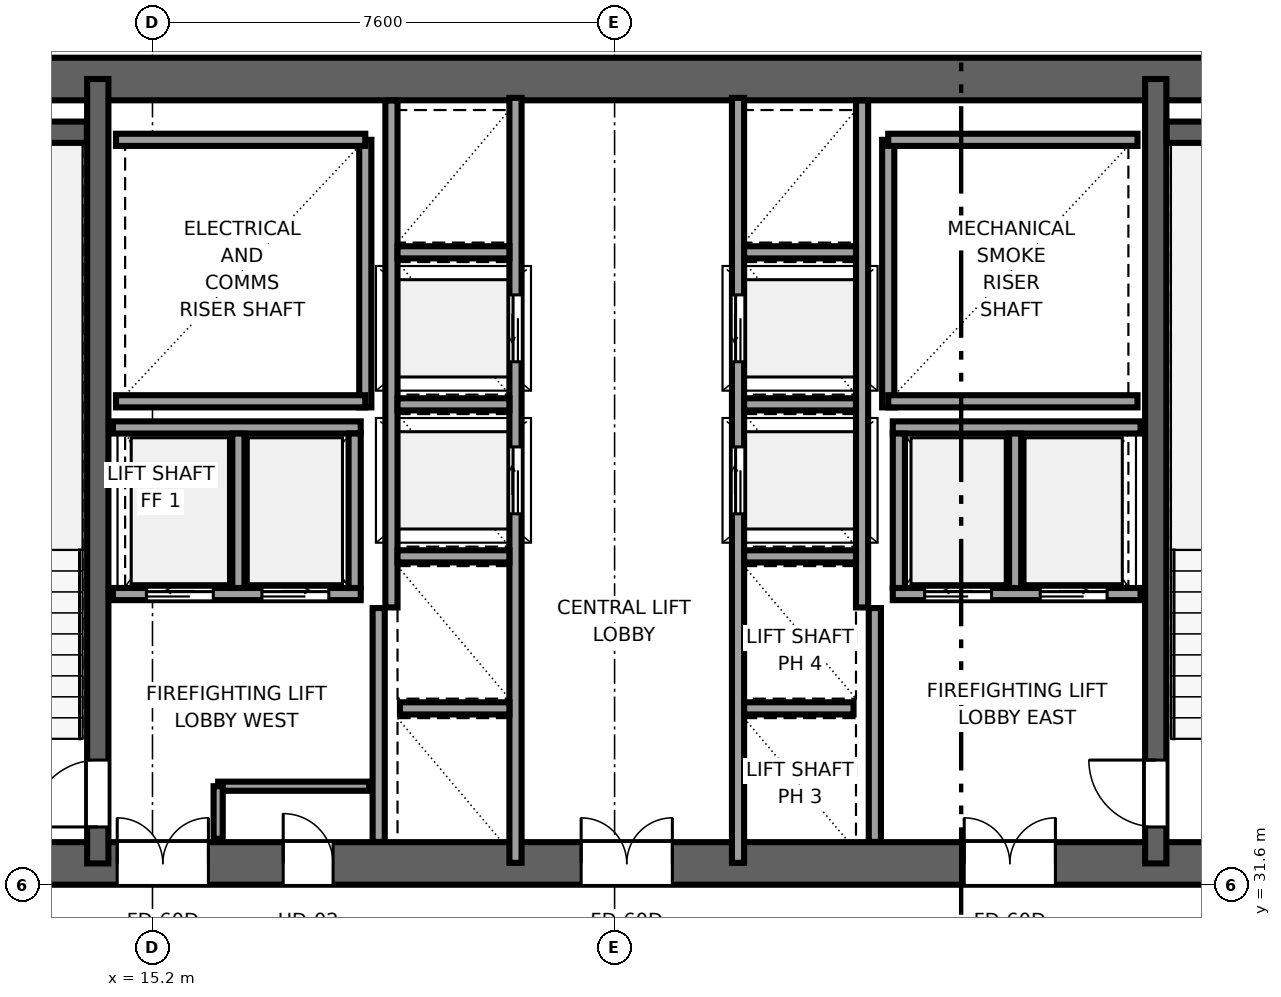
"""IFC4 building model, lengths in metres.
Left out: names, types, materials, properties, quantities, classifications, styles, units other than length and angle.
Written with IfcOpenShell. Run it as: python <this file> out.ifc"""

import sys

from ifc_helpers import new_model, si_unit, direction, frame, frame_2d, origin, place, context, subcontext, project, spatial, rectangle, extrude, source, transform, mapped, element, fill, save


model = new_model("IFC4")
c1 = context("Model", 3, precision=1e-05, world=origin(), true_north=direction((0.0, 1.0)))
c2 = subcontext(c1, "Body", "Model", "MODEL_VIEW")
j1 = project(units=[si_unit("LENGTHUNIT", "METRE"), si_unit("PLANEANGLEUNIT", "RADIAN")], contexts=[c1])
p1 = place(None, origin())
s1 = spatial("IfcSite", under=j1, at=p1, CompositionType="ELEMENT")
p2 = place(p1, origin())
s2 = spatial("IfcBuilding", under=s1, at=p2, CompositionType="ELEMENT")
p3 = place(p2, frame((0.0, 0.0, 132.85)))
s3 = spatial("IfcBuildingStorey", under=s2, at=p3, CompositionType="ELEMENT", Elevation=132.85)
p4 = place(p3, frame((9.8, 31.95, 0.0), z_axis=(0.0, 0.0, 1.0), x_axis=(1.0, 0.0, 0.0)))
e1 = element("IfcWall", 1, at=p4, inside=s3, PredefinedType="SHEAR", context=c2, shape_type="SweptSolid", body=[
    extrude(rectangle(XDim=26.4, YDim=0.7, at=frame_2d((13.2, 0.0))), origin(), (0.0, 0.0, 1.0), 3.55),
])
p5 = place(p4, frame((6.32, 0.0, 0.0), z_axis=(0.0, 0.0, 1.0), x_axis=(-1.0, 0.0, 0.0)))
e2 = element("IfcOpeningElement", 2, at=p5, cuts=e1, PredefinedType="OPENING", context=c2, shape_type="SweptSolid", body=[
    extrude(rectangle(XDim=1.5, YDim=2.04, at=frame_2d((0.75, 1.02))), frame((0.0, 0.36, 0.0), z_axis=(0.0, -1.0, 0.0), x_axis=(1.0, 0.0, 0.0)), (0.0, 0.0, 1.0), 0.72),
])
p6 = place(p4, frame((13.95, 0.0, 0.0), z_axis=(0.0, 0.0, 1.0), x_axis=(-1.0, 0.0, 0.0)))
e3 = element("IfcOpeningElement", 3, at=p6, cuts=e1, PredefinedType="OPENING", context=c2, shape_type="SweptSolid", body=[
    extrude(rectangle(XDim=1.5, YDim=2.04, at=frame_2d((0.75, 1.02))), frame((0.0, 0.36, 0.0), z_axis=(0.0, -1.0, 0.0), x_axis=(1.0, 0.0, 0.0)), (0.0, 0.0, 1.0), 0.72),
])
p7 = place(p4, frame((20.25, 0.0, 0.0), z_axis=(0.0, 0.0, 1.0), x_axis=(-1.0, 0.0, 0.0)))
e4 = element("IfcOpeningElement", 4, at=p7, cuts=e1, PredefinedType="OPENING", context=c2, shape_type="SweptSolid", body=[
    extrude(rectangle(XDim=1.5, YDim=2.04, at=frame_2d((0.75, 1.02))), frame((0.0, 0.36, 0.0), z_axis=(0.0, -1.0, 0.0), x_axis=(1.0, 0.0, 0.0)), (0.0, 0.0, 1.0), 0.72),
])
p8 = place(p4, frame((8.37, 0.0, 0.0), z_axis=(0.0, 0.0, 1.0), x_axis=(-1.0, 0.0, 0.0)))
e5 = element("IfcOpeningElement", 5, at=p8, cuts=e1, PredefinedType="OPENING", context=c2, shape_type="SweptSolid", body=[
    extrude(rectangle(XDim=0.82, YDim=2.01, at=frame_2d((0.41, 1.005))), frame((0.0, 0.36, 0.0), z_axis=(0.0, -1.0, 0.0), x_axis=(1.0, 0.0, 0.0)), (0.0, 0.0, 1.0), 0.72),
])
p9 = place(p3, frame((9.8, 44.85, 0.0), z_axis=(0.0, 0.0, 1.0), x_axis=(1.0, 0.0, 0.0)))
e6 = element("IfcWall", 6, at=p9, inside=s3, PredefinedType="SHEAR", context=c2, shape_type="SweptSolid", body=[
    extrude(rectangle(XDim=26.4, YDim=0.7, at=frame_2d((13.2, 0.0))), origin(), (0.0, 0.0, 1.0), 3.55),
])
p10 = place(p3, frame((14.3, 31.95, 0.0), z_axis=(0.0, 0.0, 1.0), x_axis=(0.0, 1.0, 0.0)))
e7 = element("IfcWall", 7, at=p10, inside=s3, PredefinedType="SHEAR", context=c2, shape_type="SweptSolid", body=[
    extrude(rectangle(XDim=12.9, YDim=0.35, at=frame_2d((6.45, 0.0))), origin(), (0.0, 0.0, 1.0), 3.55),
])
p11 = place(p10, frame((0.6, 0.0, 0.0)))
e8 = element("IfcOpeningElement", 8, at=p11, cuts=e7, PredefinedType="OPENING", context=c2, shape_type="SweptSolid", body=[
    extrude(rectangle(XDim=1.1, YDim=2.12, at=frame_2d((0.55, 1.06))), frame((0.0, 0.185, 0.0), z_axis=(0.0, -1.0, 0.0), x_axis=(1.0, 0.0, 0.0)), (0.0, 0.0, 1.0), 0.37),
])
p12 = place(p3, frame((31.7, 31.95, 0.0), z_axis=(0.0, 0.0, 1.0), x_axis=(0.0, 1.0, 0.0)))
e9 = element("IfcWall", 9, at=p12, inside=s3, PredefinedType="SHEAR", context=c2, shape_type="SweptSolid", body=[
    extrude(rectangle(XDim=12.9, YDim=0.35, at=frame_2d((6.45, 0.0))), origin(), (0.0, 0.0, 1.0), 3.55),
])
p13 = place(p12, frame((1.7, 0.0, 0.0), z_axis=(0.0, 0.0, 1.0), x_axis=(-1.0, 0.0, 0.0)))
e10 = element("IfcOpeningElement", 10, at=p13, cuts=e9, PredefinedType="OPENING", context=c2, shape_type="SweptSolid", body=[
    extrude(rectangle(XDim=1.1, YDim=2.12, at=frame_2d((0.55, 1.06))), frame((0.0, 0.185, 0.0), z_axis=(0.0, -1.0, 0.0), x_axis=(1.0, 0.0, 0.0)), (0.0, 0.0, 1.0), 0.37),
])
for number, where, z_axis, x_axis in (
    (11, (10.52, 43.975, 0.0), (0.0, 0.0, 1.0), (1.0, 0.0, 0.0)),
    (12, (31.88, 43.975, 0.0), (0.0, 0.0, 1.0), (1.0, 0.0, 0.0)),
):
    element("IfcWall", number, at=place(p3, frame(where, z_axis=z_axis, x_axis=x_axis)), inside=s3, PredefinedType="SHEAR", context=c2, shape_type="SweptSolid", body=[
        extrude(rectangle(XDim=3.6, YDim=0.35, at=frame_2d((1.8, 0.0))), origin(), (0.0, 0.0, 1.0), 3.55),
    ])
p14 = place(p3, frame((18.7, 39.45, 0.0), z_axis=(0.0, 0.0, 1.0), x_axis=(0.0, 1.0, 0.0)))
e13 = element("IfcWall", 13, at=p14, inside=s3, PredefinedType="SOLIDWALL", context=c2, shape_type="SweptSolid", body=[
    extrude(rectangle(XDim=4.4, YDim=0.2, at=frame_2d((2.2, 0.0))), origin(), (0.0, 0.0, 1.0), 3.37),
])
for number, where, z_axis, x_axis in (
    (14, (14.6, 39.55, 0.0), (0.0, 0.0, 1.0), (1.0, 0.0, 0.0)),
    (15, (14.6, 43.85, 0.0), (0.0, 0.0, 1.0), (1.0, 0.0, 0.0)),
):
    element("IfcWall", number, at=place(p3, frame(where, z_axis=z_axis, x_axis=x_axis)), inside=s3, PredefinedType="SOLIDWALL", context=c2, shape_type="SweptSolid", body=[
        extrude(rectangle(XDim=4.1, YDim=0.2, at=frame_2d((2.05, 0.0))), origin(), (0.0, 0.0, 1.0), 3.37),
    ])
p15 = place(p3, frame((27.3, 39.45, 0.0), z_axis=(0.0, 0.0, 1.0), x_axis=(0.0, 1.0, 0.0)))
e16 = element("IfcWall", 16, at=p15, inside=s3, PredefinedType="SOLIDWALL", context=c2, shape_type="SweptSolid", body=[
    extrude(rectangle(XDim=4.4, YDim=0.2, at=frame_2d((2.2, 0.0))), origin(), (0.0, 0.0, 1.0), 3.37),
])
for number, where, z_axis, x_axis in (
    (17, (27.3, 39.55, 0.0), (0.0, 0.0, 1.0), (1.0, 0.0, 0.0)),
    (18, (27.3, 43.85, 0.0), (0.0, 0.0, 1.0), (1.0, 0.0, 0.0)),
):
    element("IfcWall", number, at=place(p3, frame(where, z_axis=z_axis, x_axis=x_axis)), inside=s3, PredefinedType="SOLIDWALL", context=c2, shape_type="SweptSolid", body=[
        extrude(rectangle(XDim=4.1, YDim=0.2, at=frame_2d((2.05, 0.0))), origin(), (0.0, 0.0, 1.0), 3.37),
    ])
for number, where, z_axis, x_axis in (
    (19, (18.92, 32.304, 0.0), (0.0, 0.0, 1.0), (0.0, 1.0, 0.0)),
    (20, (27.08, 32.304, 0.0), (0.0, 0.0, 1.0), (0.0, 1.0, 0.0)),
):
    element("IfcWall", number, at=place(p3, frame(where, z_axis=z_axis, x_axis=x_axis)), inside=s3, PredefinedType="SOLIDWALL", context=c2, shape_type="SweptSolid", body=[
        extrude(rectangle(XDim=3.846, YDim=0.2, at=frame_2d((1.923, 0.0))), origin(), (0.0, 0.0, 1.0), 3.37),
    ])
p16 = place(p3, frame((21.17, 31.96, 0.0), z_axis=(0.0, 0.0, 1.0), x_axis=(0.0, 1.0, 0.0)))
e21 = element("IfcWall", 21, at=p16, inside=s3, PredefinedType="SOLIDWALL", context=c2, shape_type="SweptSolid", body=[
    extrude(rectangle(XDim=12.58, YDim=0.2, at=frame_2d((6.29, 0.0))), origin(), (0.0, 0.0, 1.0), 3.37),
])
p17 = place(p16, frame((5.74, 0.0, 0.0)))
e22 = element("IfcOpeningElement", 22, at=p17, cuts=e21, PredefinedType="OPENING", context=c2, shape_type="SweptSolid", body=[
    extrude(rectangle(XDim=1.1, YDim=2.12, at=frame_2d((0.55, 1.06))), frame((0.0, 0.11, 0.0), z_axis=(0.0, -1.0, 0.0), x_axis=(1.0, 0.0, 0.0)), (0.0, 0.0, 1.0), 0.22),
])
p18 = place(p16, frame((8.24, 0.0, 0.0)))
e23 = element("IfcOpeningElement", 23, at=p18, cuts=e21, PredefinedType="OPENING", context=c2, shape_type="SweptSolid", body=[
    extrude(rectangle(XDim=1.1, YDim=2.12, at=frame_2d((0.55, 1.06))), frame((0.0, 0.11, 0.0), z_axis=(0.0, -1.0, 0.0), x_axis=(1.0, 0.0, 0.0)), (0.0, 0.0, 1.0), 0.22),
])
p19 = place(p3, frame((19.13, 36.16, 0.0), z_axis=(0.0, 0.0, 1.0), x_axis=(0.0, 1.0, 0.0)))
e24 = element("IfcWall", 24, at=p19, inside=s3, PredefinedType="SOLIDWALL", context=c2, shape_type="SweptSolid", body=[
    extrude(rectangle(XDim=8.336, YDim=0.2, at=frame_2d((4.168, 0.0))), origin(), (0.0, 0.0, 1.0), 3.37),
])
p20 = place(p3, frame((19.27, 34.5, 0.0), z_axis=(0.0, 0.0, 1.0), x_axis=(1.0, 0.0, 0.0)))
e25 = element("IfcWall", 25, at=p20, inside=s3, PredefinedType="SOLIDWALL", context=c2, shape_type="SweptSolid", body=[
    extrude(rectangle(XDim=1.8, YDim=0.2, at=frame_2d((0.9, 0.0))), origin(), (0.0, 0.0, 1.0), 3.37),
])
for number, where, z_axis, x_axis in (
    (26, (19.23, 37.0, 0.0), (0.0, 0.0, 1.0), (1.0, 0.0, 0.0)),
    (27, (19.23, 39.5, 0.0), (0.0, 0.0, 1.0), (1.0, 0.0, 0.0)),
    (28, (19.23, 42.0, 0.0), (0.0, 0.0, 1.0), (1.0, 0.0, 0.0)),
):
    element("IfcWall", number, at=place(p3, frame(where, z_axis=z_axis, x_axis=x_axis)), inside=s3, PredefinedType="SOLIDWALL", context=c2, shape_type="SweptSolid", body=[
        extrude(rectangle(XDim=1.84, YDim=0.2, at=frame_2d((0.92, 0.0))), origin(), (0.0, 0.0, 1.0), 3.37),
    ])
p21 = place(p3, frame((27.375, 36.38, 0.0), z_axis=(0.0, 0.0, 1.0), x_axis=(1.0, 0.0, 0.0)))
e29 = element("IfcWall", 29, at=p21, inside=s3, PredefinedType="SOLIDWALL", context=c2, shape_type="SweptSolid", body=[
    extrude(rectangle(XDim=4.075, YDim=0.2, at=frame_2d((2.038, 0.0))), origin(), (0.0, 0.0, 1.0), 3.37),
])
p22 = place(p21, frame((0.525, 0.0, 0.0)))
e30 = element("IfcOpeningElement", 30, at=p22, cuts=e29, PredefinedType="OPENING", context=c2, shape_type="SweptSolid", body=[
    extrude(rectangle(XDim=1.1, YDim=2.12, at=frame_2d((0.55, 1.06))), frame((0.0, 0.11, 0.0), z_axis=(0.0, -1.0, 0.0), x_axis=(1.0, 0.0, 0.0)), (0.0, 0.0, 1.0), 0.22),
])
p23 = place(p21, frame((2.425, 0.0, 0.0)))
e31 = element("IfcOpeningElement", 31, at=p23, cuts=e29, PredefinedType="OPENING", context=c2, shape_type="SweptSolid", body=[
    extrude(rectangle(XDim=1.1, YDim=2.12, at=frame_2d((0.55, 1.06))), frame((0.0, 0.11, 0.0), z_axis=(0.0, -1.0, 0.0), x_axis=(1.0, 0.0, 0.0)), (0.0, 0.0, 1.0), 0.22),
])
p24 = place(p3, frame((27.375, 39.12, 0.0), z_axis=(0.0, 0.0, 1.0), x_axis=(1.0, 0.0, 0.0)))
e32 = element("IfcWall", 32, at=p24, inside=s3, PredefinedType="SOLIDWALL", context=c2, shape_type="SweptSolid", body=[
    extrude(rectangle(XDim=4.075, YDim=0.2, at=frame_2d((2.038, 0.0))), origin(), (0.0, 0.0, 1.0), 3.37),
])
for number, where, z_axis, x_axis in (
    (33, (27.475, 36.48, 0.0), (0.0, 0.0, 1.0), (0.0, 1.0, 0.0)),
    (34, (29.387, 36.48, 0.0), (0.0, 0.0, 1.0), (0.0, 1.0, 0.0)),
):
    element("IfcWall", number, at=place(p3, frame(where, z_axis=z_axis, x_axis=x_axis)), inside=s3, PredefinedType="SOLIDWALL", context=c2, shape_type="SweptSolid", body=[
        extrude(rectangle(XDim=2.54, YDim=0.2, at=frame_2d((1.27, 0.0))), origin(), (0.0, 0.0, 1.0), 3.37),
    ])
p25 = place(p3, frame((14.55, 36.38, 0.0), z_axis=(0.0, 0.0, 1.0), x_axis=(1.0, 0.0, 0.0)))
e35 = element("IfcWall", 35, at=p25, inside=s3, PredefinedType="SOLIDWALL", context=c2, shape_type="SweptSolid", body=[
    extrude(rectangle(XDim=4.075, YDim=0.2, at=frame_2d((2.038, 0.0))), origin(), (0.0, 0.0, 1.0), 3.37),
])
p26 = place(p25, frame((0.55, 0.0, 0.0)))
e36 = element("IfcOpeningElement", 36, at=p26, cuts=e35, PredefinedType="OPENING", context=c2, shape_type="SweptSolid", body=[
    extrude(rectangle(XDim=1.1, YDim=2.12, at=frame_2d((0.55, 1.06))), frame((0.0, 0.11, 0.0), z_axis=(0.0, -1.0, 0.0), x_axis=(1.0, 0.0, 0.0)), (0.0, 0.0, 1.0), 0.22),
])
p27 = place(p25, frame((2.45, 0.0, 0.0)))
e37 = element("IfcOpeningElement", 37, at=p27, cuts=e35, PredefinedType="OPENING", context=c2, shape_type="SweptSolid", body=[
    extrude(rectangle(XDim=1.1, YDim=2.12, at=frame_2d((0.55, 1.06))), frame((0.0, 0.11, 0.0), z_axis=(0.0, -1.0, 0.0), x_axis=(1.0, 0.0, 0.0)), (0.0, 0.0, 1.0), 0.22),
])
p28 = place(p3, frame((14.55, 39.12, 0.0), z_axis=(0.0, 0.0, 1.0), x_axis=(1.0, 0.0, 0.0)))
e38 = element("IfcWall", 38, at=p28, inside=s3, PredefinedType="SOLIDWALL", context=c2, shape_type="SweptSolid", body=[
    extrude(rectangle(XDim=4.075, YDim=0.2, at=frame_2d((2.038, 0.0))), origin(), (0.0, 0.0, 1.0), 3.37),
])
for number, where, z_axis, x_axis in (
    (39, (18.525, 36.48, 0.0), (0.0, 0.0, 1.0), (0.0, 1.0, 0.0)),
    (40, (16.613, 36.48, 0.0), (0.0, 0.0, 1.0), (0.0, 1.0, 0.0)),
):
    element("IfcWall", number, at=place(p3, frame(where, z_axis=z_axis, x_axis=x_axis)), inside=s3, PredefinedType="SOLIDWALL", context=c2, shape_type="SweptSolid", body=[
        extrude(rectangle(XDim=2.54, YDim=0.2, at=frame_2d((1.27, 0.0))), origin(), (0.0, 0.0, 1.0), 3.37),
    ])
p29 = place(p3, frame((24.83, 31.96, 0.0), z_axis=(0.0, 0.0, 1.0), x_axis=(0.0, 1.0, 0.0)))
e41 = element("IfcWall", 41, at=p29, inside=s3, PredefinedType="SOLIDWALL", context=c2, shape_type="SweptSolid", body=[
    extrude(rectangle(XDim=12.58, YDim=0.2, at=frame_2d((6.29, 0.0))), origin(), (0.0, 0.0, 1.0), 3.37),
])
p30 = place(p29, frame((5.74, 0.0, 0.0)))
e42 = element("IfcOpeningElement", 42, at=p30, cuts=e41, PredefinedType="OPENING", context=c2, shape_type="SweptSolid", body=[
    extrude(rectangle(XDim=1.1, YDim=2.12, at=frame_2d((0.55, 1.06))), frame((0.0, 0.11, 0.0), z_axis=(0.0, -1.0, 0.0), x_axis=(1.0, 0.0, 0.0)), (0.0, 0.0, 1.0), 0.22),
])
p31 = place(p29, frame((8.24, 0.0, 0.0)))
e43 = element("IfcOpeningElement", 43, at=p31, cuts=e41, PredefinedType="OPENING", context=c2, shape_type="SweptSolid", body=[
    extrude(rectangle(XDim=1.1, YDim=2.12, at=frame_2d((0.55, 1.06))), frame((0.0, 0.11, 0.0), z_axis=(0.0, -1.0, 0.0), x_axis=(1.0, 0.0, 0.0)), (0.0, 0.0, 1.0), 0.22),
])
p32 = place(p3, frame((26.87, 36.16, 0.0), z_axis=(0.0, 0.0, 1.0), x_axis=(0.0, 1.0, 0.0)))
e44 = element("IfcWall", 44, at=p32, inside=s3, PredefinedType="SOLIDWALL", context=c2, shape_type="SweptSolid", body=[
    extrude(rectangle(XDim=8.336, YDim=0.2, at=frame_2d((4.168, 0.0))), origin(), (0.0, 0.0, 1.0), 3.37),
])
p33 = place(p3, frame((24.93, 34.5, 0.0), z_axis=(0.0, 0.0, 1.0), x_axis=(1.0, 0.0, 0.0)))
e45 = element("IfcWall", 45, at=p33, inside=s3, PredefinedType="SOLIDWALL", context=c2, shape_type="SweptSolid", body=[
    extrude(rectangle(XDim=1.8, YDim=0.2, at=frame_2d((0.9, 0.0))), origin(), (0.0, 0.0, 1.0), 3.37),
])
for number, where, z_axis, x_axis in (
    (46, (24.93, 37.0, 0.0), (0.0, 0.0, 1.0), (1.0, 0.0, 0.0)),
    (47, (24.93, 39.5, 0.0), (0.0, 0.0, 1.0), (1.0, 0.0, 0.0)),
    (48, (24.93, 42.0, 0.0), (0.0, 0.0, 1.0), (1.0, 0.0, 0.0)),
):
    element("IfcWall", number, at=place(p3, frame(where, z_axis=z_axis, x_axis=x_axis)), inside=s3, PredefinedType="SOLIDWALL", context=c2, shape_type="SweptSolid", body=[
        extrude(rectangle(XDim=1.84, YDim=0.2, at=frame_2d((0.92, 0.0))), origin(), (0.0, 0.0, 1.0), 3.37),
    ])
p34 = place(p3, frame((16.28, 33.22, 0.0), z_axis=(0.0, 0.0, 1.0), x_axis=(1.0, 0.0, 0.0)))
e49 = element("IfcWall", 49, at=p34, inside=s3, PredefinedType="PARTITIONING", context=c2, shape_type="SweptSolid", body=[
    extrude(rectangle(XDim=2.485, YDim=0.15, at=frame_2d((1.242, 0.0))), origin(), (0.0, 0.0, 1.0), 3.37),
])
p35 = place(p3, frame((16.28, 32.355, 0.0), z_axis=(0.0, 0.0, 1.0), x_axis=(0.0, 1.0, 0.0)))
e50 = element("IfcWall", 50, at=p35, inside=s3, PredefinedType="PARTITIONING", context=c2, shape_type="SweptSolid", body=[
    extrude(rectangle(XDim=0.865, YDim=0.15, at=frame_2d((0.433, 0.0))), origin(), (0.0, 0.0, 1.0), 3.37),
])
m1 = source(origin(), c2, "Body", "SweptSolid", [
    extrude(rectangle(XDim=1.1, YDim=2.12, at=frame_2d((0.55, 1.06))), frame((0.0, 0.025, 0.0), z_axis=(0.0, -1.0, 0.0), x_axis=(1.0, 0.0, 0.0)), (0.0, 0.0, 1.0), 0.05),
])
p36 = place(p11, origin())
e51 = element("IfcDoor", 51, at=p36, inside=s3, OperationType="SINGLE_SWING_LEFT", PredefinedType="DOOR", context=c2, shape_type="MappedRepresentation", body=[
    mapped(m1, transform((0.0, 0.0, 0.0), x_axis=(1.0, 0.0, 0.0), y_axis=(0.0, 1.0, 0.0), z_axis=(0.0, 0.0, 1.0), scale=1.0)),
])
fill(e8, e51)
p37 = place(p13, origin())
e52 = element("IfcDoor", 52, at=p37, inside=s3, OperationType="SINGLE_SWING_RIGHT", PredefinedType="DOOR", context=c2, shape_type="MappedRepresentation", body=[
    mapped(m1, transform((0.0, 0.0, 0.0), x_axis=(1.0, 0.0, 0.0), y_axis=(0.0, 1.0, 0.0), z_axis=(0.0, 0.0, 1.0), scale=1.0)),
])
fill(e10, e52)
m2 = source(origin(), c2, "Body", "SweptSolid", [
    extrude(rectangle(XDim=1.5, YDim=2.04, at=frame_2d((0.75, 1.02))), frame((0.0, 0.025, 0.0), z_axis=(0.0, -1.0, 0.0), x_axis=(1.0, 0.0, 0.0)), (0.0, 0.0, 1.0), 0.05),
])
p38 = place(p5, origin())
e53 = element("IfcDoor", 53, at=p38, inside=s3, OperationType="DOUBLE_DOOR_SINGLE_SWING", PredefinedType="DOOR", context=c2, shape_type="MappedRepresentation", body=[
    mapped(m2, transform((0.0, 0.0, 0.0), x_axis=(1.0, 0.0, 0.0), y_axis=(0.0, 1.0, 0.0), z_axis=(0.0, 0.0, 1.0), scale=1.0)),
])
fill(e2, e53)
p39 = place(p6, origin())
e54 = element("IfcDoor", 54, at=p39, inside=s3, OperationType="DOUBLE_DOOR_SINGLE_SWING", PredefinedType="DOOR", context=c2, shape_type="MappedRepresentation", body=[
    mapped(m2, transform((0.0, 0.0, 0.0), x_axis=(1.0, 0.0, 0.0), y_axis=(0.0, 1.0, 0.0), z_axis=(0.0, 0.0, 1.0), scale=1.0)),
])
fill(e3, e54)
p40 = place(p7, origin())
e55 = element("IfcDoor", 55, at=p40, inside=s3, OperationType="DOUBLE_DOOR_SINGLE_SWING", PredefinedType="DOOR", context=c2, shape_type="MappedRepresentation", body=[
    mapped(m2, transform((0.0, 0.0, 0.0), x_axis=(1.0, 0.0, 0.0), y_axis=(0.0, 1.0, 0.0), z_axis=(0.0, 0.0, 1.0), scale=1.0)),
])
fill(e4, e55)
m3 = source(origin(), c2, "Body", "SweptSolid", [
    extrude(rectangle(XDim=0.82, YDim=2.01, at=frame_2d((0.41, 1.005))), frame((0.0, 0.025, 0.0), z_axis=(0.0, -1.0, 0.0), x_axis=(1.0, 0.0, 0.0)), (0.0, 0.0, 1.0), 0.05),
])
p41 = place(p8, origin())
e56 = element("IfcDoor", 56, at=p41, inside=s3, OperationType="SINGLE_SWING_LEFT", PredefinedType="DOOR", context=c2, shape_type="MappedRepresentation", body=[
    mapped(m3, transform((0.0, 0.0, 0.0), x_axis=(1.0, 0.0, 0.0), y_axis=(0.0, 1.0, 0.0), z_axis=(0.0, 0.0, 1.0), scale=1.0)),
])
fill(e5, e56)
m4 = source(origin(), c2, "Body", "SweptSolid", [
    extrude(rectangle(XDim=1.1, YDim=2.12, at=frame_2d((0.55, 1.06))), frame((0.0, 0.025, 0.0), z_axis=(0.0, -1.0, 0.0), x_axis=(1.0, 0.0, 0.0)), (0.0, 0.0, 1.0), 0.05),
])
p42 = place(p17, origin())
e57 = element("IfcDoor", 57, at=p42, inside=s3, OperationType="SLIDING_TO_RIGHT", PredefinedType="DOOR", context=c2, shape_type="MappedRepresentation", body=[
    mapped(m4, transform((0.0, 0.0, 0.0), x_axis=(1.0, 0.0, 0.0), y_axis=(0.0, 1.0, 0.0), z_axis=(0.0, 0.0, 1.0), scale=1.0)),
])
fill(e22, e57)
p43 = place(p18, origin())
e58 = element("IfcDoor", 58, at=p43, inside=s3, OperationType="SLIDING_TO_LEFT", PredefinedType="DOOR", context=c2, shape_type="MappedRepresentation", body=[
    mapped(m4, transform((0.0, 0.0, 0.0), x_axis=(1.0, 0.0, 0.0), y_axis=(0.0, 1.0, 0.0), z_axis=(0.0, 0.0, 1.0), scale=1.0)),
])
fill(e23, e58)
p44 = place(p22, origin())
e59 = element("IfcDoor", 59, at=p44, inside=s3, OperationType="SLIDING_TO_LEFT", PredefinedType="DOOR", context=c2, shape_type="MappedRepresentation", body=[
    mapped(m4, transform((0.0, 0.0, 0.0), x_axis=(1.0, 0.0, 0.0), y_axis=(0.0, 1.0, 0.0), z_axis=(0.0, 0.0, 1.0), scale=1.0)),
])
fill(e30, e59)
p45 = place(p23, origin())
e60 = element("IfcDoor", 60, at=p45, inside=s3, OperationType="SLIDING_TO_RIGHT", PredefinedType="DOOR", context=c2, shape_type="MappedRepresentation", body=[
    mapped(m4, transform((0.0, 0.0, 0.0), x_axis=(1.0, 0.0, 0.0), y_axis=(0.0, 1.0, 0.0), z_axis=(0.0, 0.0, 1.0), scale=1.0)),
])
fill(e31, e60)
p46 = place(p26, origin())
e61 = element("IfcDoor", 61, at=p46, inside=s3, OperationType="SLIDING_TO_LEFT", PredefinedType="DOOR", context=c2, shape_type="MappedRepresentation", body=[
    mapped(m4, transform((0.0, 0.0, 0.0), x_axis=(1.0, 0.0, 0.0), y_axis=(0.0, 1.0, 0.0), z_axis=(0.0, 0.0, 1.0), scale=1.0)),
])
fill(e36, e61)
p47 = place(p27, origin())
e62 = element("IfcDoor", 62, at=p47, inside=s3, OperationType="SLIDING_TO_RIGHT", PredefinedType="DOOR", context=c2, shape_type="MappedRepresentation", body=[
    mapped(m4, transform((0.0, 0.0, 0.0), x_axis=(1.0, 0.0, 0.0), y_axis=(0.0, 1.0, 0.0), z_axis=(0.0, 0.0, 1.0), scale=1.0)),
])
fill(e37, e62)
p48 = place(p30, origin())
e63 = element("IfcDoor", 63, at=p48, inside=s3, OperationType="SLIDING_TO_RIGHT", PredefinedType="DOOR", context=c2, shape_type="MappedRepresentation", body=[
    mapped(m4, transform((0.0, 0.0, 0.0), x_axis=(1.0, 0.0, 0.0), y_axis=(0.0, 1.0, 0.0), z_axis=(0.0, 0.0, 1.0), scale=1.0)),
])
fill(e42, e63)
p49 = place(p31, origin())
e64 = element("IfcDoor", 64, at=p49, inside=s3, OperationType="SLIDING_TO_LEFT", PredefinedType="DOOR", context=c2, shape_type="MappedRepresentation", body=[
    mapped(m4, transform((0.0, 0.0, 0.0), x_axis=(1.0, 0.0, 0.0), y_axis=(0.0, 1.0, 0.0), z_axis=(0.0, 0.0, 1.0), scale=1.0)),
])
fill(e43, e64)
save(model, sys.argv[1])
